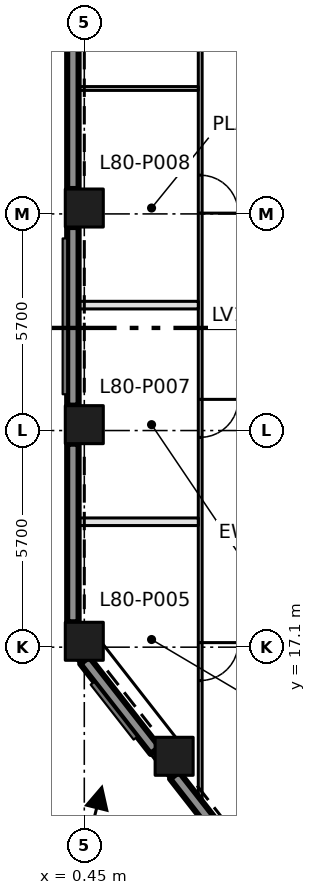
"""IFC4 building model, lengths in metres.
Left out: names, types, materials, properties, quantities, classifications, styles, units other than length and angle.
Written with IfcOpenShell. Run it as: python <this file> out.ifc"""

import sys

from ifc_helpers import new_model, si_unit, direction, frame, frame_2d, origin, origin_2d, place, context, subcontext, project, spatial, rectangle, extrude, element, fill, save


model = new_model("IFC4")
c1 = context("Model", 3, precision=1e-05, world=origin(), true_north=direction((0.0, 1.0)))
c2 = subcontext(c1, "Body", "Model", "MODEL_VIEW")
j1 = project(units=[si_unit("LENGTHUNIT", "METRE"), si_unit("PLANEANGLEUNIT", "RADIAN")], contexts=[c1])
p1 = place(None, origin())
s1 = spatial("IfcSite", under=j1, at=p1, CompositionType="ELEMENT")
p2 = place(p1, origin())
s2 = spatial("IfcBuilding", under=s1, at=p2, CompositionType="ELEMENT")
p3 = place(p2, frame((0.0, 0.0, 348.6)))
s3 = spatial("IfcBuildingStorey", under=s2, at=p3, CompositionType="ELEMENT", Elevation=348.6)
for number, where, z_axis, x_axis in (
    (1, (0.45, 17.255, 0.0), (0.0, 0.0, 1.0), (1.0, 0.0, 0.0)),
    (2, (0.45, 22.955, 0.0), (0.0, 0.0, 1.0), (1.0, 0.0, 0.0)),
    (3, (0.45, 28.655, 0.0), (0.0, 0.0, 1.0), (1.0, 0.0, 0.0)),
    (4, (2.814, 14.229, 0.0), (0.0, 0.0, 1.0), (1.0, 0.0, 0.0)),
):
    element("IfcColumn", number, at=place(p3, frame(where, z_axis=z_axis, x_axis=x_axis)), inside=s3, PredefinedType="COLUMN", context=c2, shape_type="SweptSolid", body=[
        extrude(rectangle(XDim=1.0, YDim=1.0, at=origin_2d()), origin(), (0.0, 0.0, 1.0), 5.4),
    ])
p4 = place(p3, frame((3.5, 40.37, 0.0), z_axis=(0.0, 0.0, 1.0), x_axis=(0.0, -1.0, 0.0)))
e5 = element("IfcWall", 5, at=p4, inside=s3, PredefinedType="PARTITIONING", context=c2, shape_type="SweptSolid", body=[
    extrude(rectangle(XDim=27.282, YDim=0.1, at=frame_2d((13.641, 0.0))), origin(), (0.0, 0.0, 1.0), 5.1),
])
p5 = place(p4, frame((23.15, 0.0, 0.0)))
e6 = element("IfcOpeningElement", 6, at=p5, cuts=e5, PredefinedType="OPENING", context=c2, shape_type="SweptSolid", body=[
    extrude(rectangle(XDim=1.0, YDim=2.1, at=frame_2d((0.5, 1.05))), frame((0.0, 0.06, 0.0), z_axis=(0.0, -1.0, 0.0), x_axis=(1.0, 0.0, 0.0)), (0.0, 0.0, 1.0), 0.12),
])
p6 = place(p4, frame((16.75, 0.0, 0.0)))
e7 = element("IfcOpeningElement", 7, at=p6, cuts=e5, PredefinedType="OPENING", context=c2, shape_type="SweptSolid", body=[
    extrude(rectangle(XDim=1.0, YDim=2.1, at=frame_2d((0.5, 1.05))), frame((0.0, 0.06, 0.0), z_axis=(0.0, -1.0, 0.0), x_axis=(1.0, 0.0, 0.0)), (0.0, 0.0, 1.0), 0.12),
])
p7 = place(p4, frame((10.85, 0.0, 0.0)))
e8 = element("IfcOpeningElement", 8, at=p7, cuts=e5, PredefinedType="OPENING", context=c2, shape_type="SweptSolid", body=[
    extrude(rectangle(XDim=1.0, YDim=2.1, at=frame_2d((0.5, 1.05))), frame((0.0, 0.06, 0.0), z_axis=(0.0, -1.0, 0.0), x_axis=(1.0, 0.0, 0.0)), (0.0, 0.0, 1.0), 0.12),
])
for number, where, z_axis, x_axis in (
    (9, (3.45, 20.4, 0.0), (0.0, 0.0, 1.0), (-1.0, 0.0, 0.0)),
    (10, (3.45, 26.1, 0.0), (0.0, 0.0, 1.0), (-1.0, 0.0, 0.0)),
):
    element("IfcWall", number, at=place(p3, frame(where, z_axis=z_axis, x_axis=x_axis)), inside=s3, PredefinedType="PARTITIONING", context=c2, shape_type="SweptSolid", body=[
        extrude(rectangle(XDim=3.17, YDim=0.2, at=frame_2d((1.585, 0.0))), origin(), (0.0, 0.0, 1.0), 5.1),
    ])
p8 = place(p3, frame((3.45, 31.8, 0.0), z_axis=(0.0, 0.0, 1.0), x_axis=(-1.0, 0.0, 0.0)))
e11 = element("IfcWall", 11, at=p8, inside=s3, PredefinedType="PARTITIONING", context=c2, shape_type="SweptSolid", body=[
    extrude(rectangle(XDim=3.17, YDim=0.1, at=frame_2d((1.585, 0.0))), origin(), (0.0, 0.0, 1.0), 5.1),
])
for number, where, z_axis, x_axis in (
    (12, (0.15, 33.855, 0.0), (0.0, 0.0, 1.0), (0.0, -1.0, 0.0)),
    (13, (0.15, 28.155, 0.0), (0.0, 0.0, 1.0), (0.0, -1.0, 0.0)),
):
    element("IfcWall", number, at=place(p3, frame(where, z_axis=z_axis, x_axis=x_axis)), inside=s3, PredefinedType="SOLIDWALL", context=c2, shape_type="SweptSolid", body=[
        extrude(rectangle(XDim=4.7, YDim=0.3, at=frame_2d((2.35, 0.0))), origin(), (0.0, 0.0, 1.0), 4.4),
    ])
p9 = place(p3, frame((0.15, 22.454, 0.0), z_axis=(0.0, 0.0, 1.0), x_axis=(0.0, -1.0, 0.0)))
e14 = element("IfcWall", 14, at=p9, inside=s3, PredefinedType="SOLIDWALL", context=c2, shape_type="SweptSolid", body=[
    extrude(rectangle(XDim=4.699, YDim=0.3, at=frame_2d((2.35, 0.0))), origin(), (0.0, 0.0, 1.0), 4.4),
])
p10 = place(p3, frame((0.46, 16.755, 0.0), z_axis=(0.0, 0.0, 1.0), x_axis=(0.615695961149, -0.787983809113, 0.0)))
e15 = element("IfcWall", 15, at=p10, inside=s3, PredefinedType="SOLIDWALL", context=c2, shape_type="SweptSolid", body=[
    extrude(rectangle(XDim=3.011, YDim=0.3, at=frame_2d((1.506, 0.0))), origin(), (0.0, 0.0, 1.0), 4.4),
])
p11 = place(p3, frame((2.824, 13.729, 0.0), z_axis=(0.0, 0.0, 1.0), x_axis=(0.61572963607, -0.78795749585, 0.0)))
e16 = element("IfcWall", 16, at=p11, inside=s3, PredefinedType="SOLIDWALL", context=c2, shape_type="SweptSolid", body=[
    extrude(rectangle(XDim=4.871, YDim=0.3, at=frame_2d((2.435, 0.0))), origin(), (0.0, 0.0, 1.0), 4.4),
])
p12 = place(p5, origin())
e17 = element("IfcDoor", 17, at=p12, inside=s3, OperationType="SINGLE_SWING_LEFT", PredefinedType="DOOR", context=c2, shape_type="SweptSolid", body=[
    extrude(rectangle(XDim=1.0, YDim=2.1, at=frame_2d((0.5, 1.05))), frame((0.0, 0.025, 0.0), z_axis=(0.0, -1.0, 0.0), x_axis=(1.0, 0.0, 0.0)), (0.0, 0.0, 1.0), 0.05),
])
fill(e6, e17)
p13 = place(p6, origin())
e18 = element("IfcDoor", 18, at=p13, inside=s3, OperationType="SINGLE_SWING_LEFT", PredefinedType="DOOR", context=c2, shape_type="SweptSolid", body=[
    extrude(rectangle(XDim=1.0, YDim=2.1, at=frame_2d((0.5, 1.05))), frame((0.0, 0.025, 0.0), z_axis=(0.0, -1.0, 0.0), x_axis=(1.0, 0.0, 0.0)), (0.0, 0.0, 1.0), 0.05),
])
fill(e7, e18)
p14 = place(p7, origin())
e19 = element("IfcDoor", 19, at=p14, inside=s3, OperationType="SINGLE_SWING_RIGHT", PredefinedType="DOOR", context=c2, shape_type="SweptSolid", body=[
    extrude(rectangle(XDim=1.0, YDim=2.1, at=frame_2d((0.5, 1.05))), frame((0.0, 0.025, 0.0), z_axis=(0.0, -1.0, 0.0), x_axis=(1.0, 0.0, 0.0)), (0.0, 0.0, 1.0), 0.05),
])
fill(e8, e19)
save(model, sys.argv[1])
